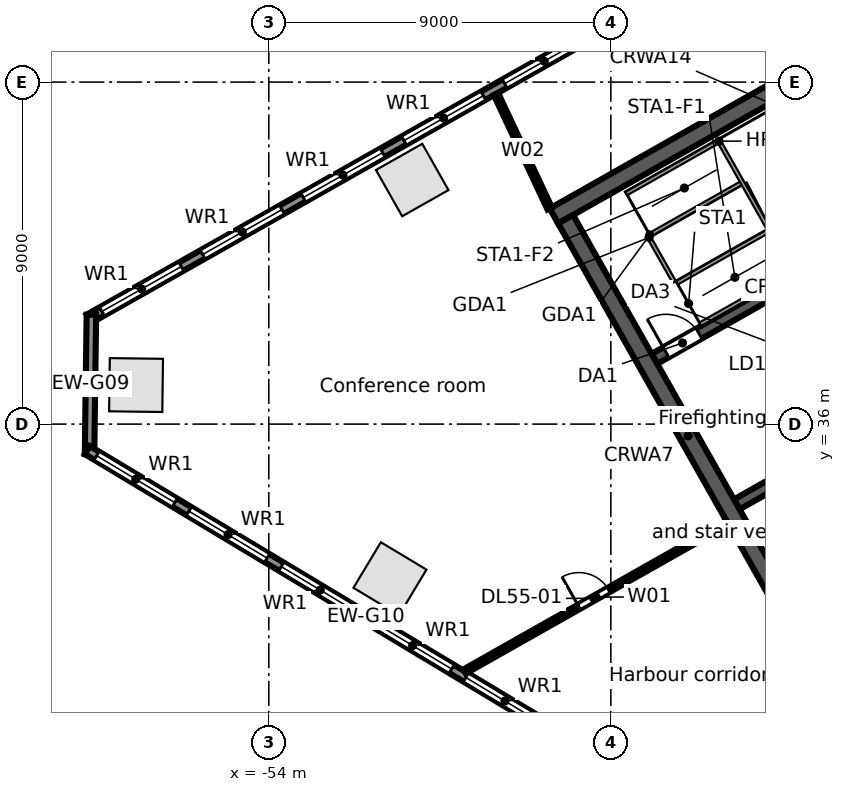
"""IFC4 building model, lengths in metres.
Left out: names, types, materials, properties, quantities, classifications, styles, units other than length and angle.
Written with IfcOpenShell. Run it as: python <this file> out.ifc"""

import sys

from ifc_helpers import new_model, si_unit, direction, frame, frame_2d, origin, origin_2d, place, context, subcontext, project, spatial, rectangle, extrude, element, fill, save


model = new_model("IFC4")
c1 = context("Model", 3, precision=1e-05, world=origin(), true_north=direction((0.0, 1.0)))
c2 = subcontext(c1, "Body", "Model", "MODEL_VIEW")
j1 = project(units=[si_unit("LENGTHUNIT", "METRE"), si_unit("PLANEANGLEUNIT", "RADIAN")], contexts=[c1])
p1 = place(None, origin())
s1 = spatial("IfcSite", under=j1, at=p1, CompositionType="ELEMENT")
p2 = place(p1, origin())
s2 = spatial("IfcBuilding", under=s1, at=p2, CompositionType="ELEMENT")
p3 = place(p2, frame((0.0, 0.0, 254.3)))
s3 = spatial("IfcBuildingStorey", under=s2, at=p3, CompositionType="ELEMENT", Elevation=254.3)
for number, where, z_axis, x_axis in (
    (1, (-50.226, 42.423, 0.0), (0.0, 0.0, 1.0), (-0.87, -0.492, 0.0)),
    (2, (-57.493, 37.027, 0.0), (0.0, 0.0, 1.0), (-0.013, -1.0, 0.0)),
    (3, (-50.812, 31.931, 0.0), (0.0, 0.0, 1.0), (0.857, -0.515, 0.0)),
):
    element("IfcColumn", number, at=place(p3, frame(where, z_axis=z_axis, x_axis=x_axis)), inside=s3, PredefinedType="COLUMN", context=c2, shape_type="SweptSolid", body=[
        extrude(rectangle(XDim=1.4, YDim=1.4, at=origin_2d()), origin(), (0.0, 0.0, 1.0), 3.9),
    ])
p4 = place(p3, frame((-58.732, 38.771, 0.0), z_axis=(0.0, 0.0, 1.0), x_axis=(0.870354824205, 0.492425100887, 0.0)))
e4 = element("IfcWall", 4, at=p4, inside=s3, PredefinedType="STANDARD", context=c2, shape_type="SweptSolid", body=[
    extrude(rectangle(XDim=64.006, YDim=0.25, at=frame_2d((32.003, 0.0))), origin(), (0.0, 0.0, 1.0), 3.55),
])
p5 = place(p4, frame((61.259, 0.0, 0.8)))
e5 = element("IfcOpeningElement", 5, at=p5, cuts=e4, PredefinedType="OPENING", context=c2, shape_type="SweptSolid", body=[
    extrude(rectangle(XDim=2.4, YDim=2.2, at=frame_2d((1.2, 1.1))), frame((0.0, 0.135, 0.0), z_axis=(0.0, -1.0, 0.0), x_axis=(1.0, 0.0, 0.0)), (0.0, 0.0, 1.0), 0.27),
])
p6 = place(p4, frame((58.216, 0.0, 0.8)))
e6 = element("IfcOpeningElement", 6, at=p6, cuts=e4, PredefinedType="OPENING", context=c2, shape_type="SweptSolid", body=[
    extrude(rectangle(XDim=2.4, YDim=2.2, at=frame_2d((1.2, 1.1))), frame((0.0, 0.135, 0.0), z_axis=(0.0, -1.0, 0.0), x_axis=(1.0, 0.0, 0.0)), (0.0, 0.0, 1.0), 0.27),
])
p7 = place(p4, frame((55.173, 0.0, 0.8)))
e7 = element("IfcOpeningElement", 7, at=p7, cuts=e4, PredefinedType="OPENING", context=c2, shape_type="SweptSolid", body=[
    extrude(rectangle(XDim=2.4, YDim=2.2, at=frame_2d((1.2, 1.1))), frame((0.0, 0.135, 0.0), z_axis=(0.0, -1.0, 0.0), x_axis=(1.0, 0.0, 0.0)), (0.0, 0.0, 1.0), 0.27),
])
p8 = place(p4, frame((52.129, 0.0, 0.8)))
e8 = element("IfcOpeningElement", 8, at=p8, cuts=e4, PredefinedType="OPENING", context=c2, shape_type="SweptSolid", body=[
    extrude(rectangle(XDim=2.4, YDim=2.2, at=frame_2d((1.2, 1.1))), frame((0.0, 0.135, 0.0), z_axis=(0.0, -1.0, 0.0), x_axis=(1.0, 0.0, 0.0)), (0.0, 0.0, 1.0), 0.27),
])
p9 = place(p4, frame((49.086, 0.0, 0.8)))
e9 = element("IfcOpeningElement", 9, at=p9, cuts=e4, PredefinedType="OPENING", context=c2, shape_type="SweptSolid", body=[
    extrude(rectangle(XDim=2.4, YDim=2.2, at=frame_2d((1.2, 1.1))), frame((0.0, 0.135, 0.0), z_axis=(0.0, -1.0, 0.0), x_axis=(1.0, 0.0, 0.0)), (0.0, 0.0, 1.0), 0.27),
])
p10 = place(p4, frame((46.043, 0.0, 0.8)))
e10 = element("IfcOpeningElement", 10, at=p10, cuts=e4, PredefinedType="OPENING", context=c2, shape_type="SweptSolid", body=[
    extrude(rectangle(XDim=2.4, YDim=2.2, at=frame_2d((1.2, 1.1))), frame((0.0, 0.135, 0.0), z_axis=(0.0, -1.0, 0.0), x_axis=(1.0, 0.0, 0.0)), (0.0, 0.0, 1.0), 0.27),
])
p11 = place(p4, frame((43.0, 0.0, 0.8)))
e11 = element("IfcOpeningElement", 11, at=p11, cuts=e4, PredefinedType="OPENING", context=c2, shape_type="SweptSolid", body=[
    extrude(rectangle(XDim=2.4, YDim=2.2, at=frame_2d((1.2, 1.1))), frame((0.0, 0.135, 0.0), z_axis=(0.0, -1.0, 0.0), x_axis=(1.0, 0.0, 0.0)), (0.0, 0.0, 1.0), 0.27),
])
p12 = place(p4, frame((39.956, 0.0, 0.8)))
e12 = element("IfcOpeningElement", 12, at=p12, cuts=e4, PredefinedType="OPENING", context=c2, shape_type="SweptSolid", body=[
    extrude(rectangle(XDim=2.4, YDim=2.2, at=frame_2d((1.2, 1.1))), frame((0.0, 0.135, 0.0), z_axis=(0.0, -1.0, 0.0), x_axis=(1.0, 0.0, 0.0)), (0.0, 0.0, 1.0), 0.27),
])
p13 = place(p4, frame((36.913, 0.0, 0.8)))
e13 = element("IfcOpeningElement", 13, at=p13, cuts=e4, PredefinedType="OPENING", context=c2, shape_type="SweptSolid", body=[
    extrude(rectangle(XDim=2.4, YDim=2.2, at=frame_2d((1.2, 1.1))), frame((0.0, 0.135, 0.0), z_axis=(0.0, -1.0, 0.0), x_axis=(1.0, 0.0, 0.0)), (0.0, 0.0, 1.0), 0.27),
])
p14 = place(p4, frame((33.87, 0.0, 0.8)))
e14 = element("IfcOpeningElement", 14, at=p14, cuts=e4, PredefinedType="OPENING", context=c2, shape_type="SweptSolid", body=[
    extrude(rectangle(XDim=2.4, YDim=2.2, at=frame_2d((1.2, 1.1))), frame((0.0, 0.135, 0.0), z_axis=(0.0, -1.0, 0.0), x_axis=(1.0, 0.0, 0.0)), (0.0, 0.0, 1.0), 0.27),
])
p15 = place(p4, frame((30.826, 0.0, 0.8)))
e15 = element("IfcOpeningElement", 15, at=p15, cuts=e4, PredefinedType="OPENING", context=c2, shape_type="SweptSolid", body=[
    extrude(rectangle(XDim=2.4, YDim=2.2, at=frame_2d((1.2, 1.1))), frame((0.0, 0.135, 0.0), z_axis=(0.0, -1.0, 0.0), x_axis=(1.0, 0.0, 0.0)), (0.0, 0.0, 1.0), 0.27),
])
p16 = place(p4, frame((27.783, 0.0, 0.8)))
e16 = element("IfcOpeningElement", 16, at=p16, cuts=e4, PredefinedType="OPENING", context=c2, shape_type="SweptSolid", body=[
    extrude(rectangle(XDim=2.4, YDim=2.2, at=frame_2d((1.2, 1.1))), frame((0.0, 0.135, 0.0), z_axis=(0.0, -1.0, 0.0), x_axis=(1.0, 0.0, 0.0)), (0.0, 0.0, 1.0), 0.27),
])
p17 = place(p4, frame((24.74, 0.0, 0.8)))
e17 = element("IfcOpeningElement", 17, at=p17, cuts=e4, PredefinedType="OPENING", context=c2, shape_type="SweptSolid", body=[
    extrude(rectangle(XDim=2.4, YDim=2.2, at=frame_2d((1.2, 1.1))), frame((0.0, 0.135, 0.0), z_axis=(0.0, -1.0, 0.0), x_axis=(1.0, 0.0, 0.0)), (0.0, 0.0, 1.0), 0.27),
])
p18 = place(p4, frame((21.696, 0.0, 0.8)))
e18 = element("IfcOpeningElement", 18, at=p18, cuts=e4, PredefinedType="OPENING", context=c2, shape_type="SweptSolid", body=[
    extrude(rectangle(XDim=2.4, YDim=2.2, at=frame_2d((1.2, 1.1))), frame((0.0, 0.135, 0.0), z_axis=(0.0, -1.0, 0.0), x_axis=(1.0, 0.0, 0.0)), (0.0, 0.0, 1.0), 0.27),
])
p19 = place(p4, frame((18.653, 0.0, 0.8)))
e19 = element("IfcOpeningElement", 19, at=p19, cuts=e4, PredefinedType="OPENING", context=c2, shape_type="SweptSolid", body=[
    extrude(rectangle(XDim=2.4, YDim=2.2, at=frame_2d((1.2, 1.1))), frame((0.0, 0.135, 0.0), z_axis=(0.0, -1.0, 0.0), x_axis=(1.0, 0.0, 0.0)), (0.0, 0.0, 1.0), 0.27),
])
p20 = place(p4, frame((15.61, 0.0, 0.8)))
e20 = element("IfcOpeningElement", 20, at=p20, cuts=e4, PredefinedType="OPENING", context=c2, shape_type="SweptSolid", body=[
    extrude(rectangle(XDim=2.4, YDim=2.2, at=frame_2d((1.2, 1.1))), frame((0.0, 0.135, 0.0), z_axis=(0.0, -1.0, 0.0), x_axis=(1.0, 0.0, 0.0)), (0.0, 0.0, 1.0), 0.27),
])
p21 = place(p4, frame((12.567, 0.0, 0.8)))
e21 = element("IfcOpeningElement", 21, at=p21, cuts=e4, PredefinedType="OPENING", context=c2, shape_type="SweptSolid", body=[
    extrude(rectangle(XDim=2.4, YDim=2.2, at=frame_2d((1.2, 1.1))), frame((0.0, 0.135, 0.0), z_axis=(0.0, -1.0, 0.0), x_axis=(1.0, 0.0, 0.0)), (0.0, 0.0, 1.0), 0.27),
])
p22 = place(p4, frame((9.523, 0.0, 0.8)))
e22 = element("IfcOpeningElement", 22, at=p22, cuts=e4, PredefinedType="OPENING", context=c2, shape_type="SweptSolid", body=[
    extrude(rectangle(XDim=2.4, YDim=2.2, at=frame_2d((1.2, 1.1))), frame((0.0, 0.135, 0.0), z_axis=(0.0, -1.0, 0.0), x_axis=(1.0, 0.0, 0.0)), (0.0, 0.0, 1.0), 0.27),
])
p23 = place(p4, frame((6.48, 0.0, 0.8)))
e23 = element("IfcOpeningElement", 23, at=p23, cuts=e4, PredefinedType="OPENING", context=c2, shape_type="SweptSolid", body=[
    extrude(rectangle(XDim=2.4, YDim=2.2, at=frame_2d((1.2, 1.1))), frame((0.0, 0.135, 0.0), z_axis=(0.0, -1.0, 0.0), x_axis=(1.0, 0.0, 0.0)), (0.0, 0.0, 1.0), 0.27),
])
p24 = place(p4, frame((3.437, 0.0, 0.8)))
e24 = element("IfcOpeningElement", 24, at=p24, cuts=e4, PredefinedType="OPENING", context=c2, shape_type="SweptSolid", body=[
    extrude(rectangle(XDim=2.4, YDim=2.2, at=frame_2d((1.2, 1.1))), frame((0.0, 0.135, 0.0), z_axis=(0.0, -1.0, 0.0), x_axis=(1.0, 0.0, 0.0)), (0.0, 0.0, 1.0), 0.27),
])
p25 = place(p4, frame((0.393, 0.0, 0.8)))
e25 = element("IfcOpeningElement", 25, at=p25, cuts=e4, PredefinedType="OPENING", context=c2, shape_type="SweptSolid", body=[
    extrude(rectangle(XDim=2.4, YDim=2.2, at=frame_2d((1.2, 1.1))), frame((0.0, 0.135, 0.0), z_axis=(0.0, -1.0, 0.0), x_axis=(1.0, 0.0, 0.0)), (0.0, 0.0, 1.0), 0.27),
])
p26 = place(p3, frame((-58.717, 35.208, 0.0), z_axis=(0.0, 0.0, 1.0), x_axis=(0.01310512158, 0.999914124207, 0.0)))
e26 = element("IfcWall", 26, at=p26, inside=s3, PredefinedType="STANDARD", context=c2, shape_type="SweptSolid", body=[
    extrude(rectangle(XDim=3.67, YDim=0.25, at=frame_2d((1.835, 0.0))), origin(), (0.0, 0.0, 1.0), 3.55),
])
p27 = place(p3, frame((-44.115, 26.507, 0.0), z_axis=(0.0, 0.0, 1.0), x_axis=(-0.857166583633, 0.515039268311, 0.0)))
e27 = element("IfcWall", 27, at=p27, inside=s3, PredefinedType="STANDARD", context=c2, shape_type="SweptSolid", body=[
    extrude(rectangle(XDim=17.106, YDim=0.25, at=frame_2d((8.553, 0.0))), origin(), (0.0, 0.0, 1.0), 3.55),
])
p28 = place(p27, frame((14.417, 0.0, 0.8)))
e28 = element("IfcOpeningElement", 28, at=p28, cuts=e27, PredefinedType="OPENING", context=c2, shape_type="SweptSolid", body=[
    extrude(rectangle(XDim=2.4, YDim=2.2, at=frame_2d((1.2, 1.1))), frame((0.0, 0.135, 0.0), z_axis=(0.0, -1.0, 0.0), x_axis=(1.0, 0.0, 0.0)), (0.0, 0.0, 1.0), 0.27),
])
p29 = place(p27, frame((11.584, 0.0, 0.8)))
e29 = element("IfcOpeningElement", 29, at=p29, cuts=e27, PredefinedType="OPENING", context=c2, shape_type="SweptSolid", body=[
    extrude(rectangle(XDim=2.4, YDim=2.2, at=frame_2d((1.2, 1.1))), frame((0.0, 0.135, 0.0), z_axis=(0.0, -1.0, 0.0), x_axis=(1.0, 0.0, 0.0)), (0.0, 0.0, 1.0), 0.27),
])
p30 = place(p27, frame((8.75, 0.0, 0.8)))
e30 = element("IfcOpeningElement", 30, at=p30, cuts=e27, PredefinedType="OPENING", context=c2, shape_type="SweptSolid", body=[
    extrude(rectangle(XDim=2.4, YDim=2.2, at=frame_2d((1.2, 1.1))), frame((0.0, 0.135, 0.0), z_axis=(0.0, -1.0, 0.0), x_axis=(1.0, 0.0, 0.0)), (0.0, 0.0, 1.0), 0.27),
])
p31 = place(p27, frame((5.917, 0.0, 0.8)))
e31 = element("IfcOpeningElement", 31, at=p31, cuts=e27, PredefinedType="OPENING", context=c2, shape_type="SweptSolid", body=[
    extrude(rectangle(XDim=2.4, YDim=2.2, at=frame_2d((1.2, 1.1))), frame((0.0, 0.135, 0.0), z_axis=(0.0, -1.0, 0.0), x_axis=(1.0, 0.0, 0.0)), (0.0, 0.0, 1.0), 0.27),
])
p32 = place(p27, frame((3.084, 0.0, 0.8)))
e32 = element("IfcOpeningElement", 32, at=p32, cuts=e27, PredefinedType="OPENING", context=c2, shape_type="SweptSolid", body=[
    extrude(rectangle(XDim=2.4, YDim=2.2, at=frame_2d((1.2, 1.1))), frame((0.0, 0.135, 0.0), z_axis=(0.0, -1.0, 0.0), x_axis=(1.0, 0.0, 0.0)), (0.0, 0.0, 1.0), 0.27),
])
p33 = place(p27, frame((0.25, 0.0, 0.8)))
e33 = element("IfcOpeningElement", 33, at=p33, cuts=e27, PredefinedType="OPENING", context=c2, shape_type="SweptSolid", body=[
    extrude(rectangle(XDim=2.4, YDim=2.2, at=frame_2d((1.2, 1.1))), frame((0.0, 0.135, 0.0), z_axis=(0.0, -1.0, 0.0), x_axis=(1.0, 0.0, 0.0)), (0.0, 0.0, 1.0), 0.27),
])
p34 = place(p3, frame((-41.687, 33.887, 0.0), z_axis=(0.0, 0.0, 1.0), x_axis=(0.870355736587, 0.49242348826, 0.0)))
e34 = element("IfcWall", 34, at=p34, inside=s3, PredefinedType="SOLIDWALL", context=c2, shape_type="SweptSolid", body=[
    extrude(rectangle(XDim=6.15, YDim=0.3, at=frame_2d((3.075, 0.0))), origin(), (0.0, 0.0, 1.0), 3.55),
])
p35 = place(p34, frame((1.25, 0.0, 0.0)))
e35 = element("IfcOpeningElement", 35, at=p35, cuts=e34, PredefinedType="OPENING", context=c2, shape_type="SweptSolid", body=[
    extrude(rectangle(XDim=1.1, YDim=2.1, at=frame_2d((0.55, 1.05))), frame((0.0, 0.16, 0.0), z_axis=(0.0, -1.0, 0.0), x_axis=(1.0, 0.0, 0.0)), (0.0, 0.0, 1.0), 0.32),
])
p36 = place(p34, frame((4.4, 0.0, 0.0)))
e36 = element("IfcOpeningElement", 36, at=p36, cuts=e34, PredefinedType="OPENING", context=c2, shape_type="SweptSolid", body=[
    extrude(rectangle(XDim=1.1, YDim=2.1, at=frame_2d((0.55, 1.05))), frame((0.0, 0.16, 0.0), z_axis=(0.0, -1.0, 0.0), x_axis=(1.0, 0.0, 0.0)), (0.0, 0.0, 1.0), 0.32),
])
p37 = place(p3, frame((-43.853, 37.717, 0.0), z_axis=(0.0, 0.0, 1.0), x_axis=(0.870360409231, 0.492415229297, 0.0)))
e37 = element("IfcWall", 37, at=p37, inside=s3, PredefinedType="SOLIDWALL", context=c2, shape_type="SweptSolid", body=[
    extrude(rectangle(XDim=7.55, YDim=0.3, at=frame_2d((3.775, 0.0))), origin(), (0.0, 0.0, 1.0), 3.55),
])
p38 = place(p37, frame((0.35, 0.0, 0.0)))
e38 = element("IfcOpeningElement", 38, at=p38, cuts=e37, PredefinedType="OPENING", context=c2, shape_type="SweptSolid", body=[
    extrude(rectangle(XDim=1.0, YDim=2.1, at=frame_2d((0.5, 1.05))), frame((0.0, 0.16, 0.0), z_axis=(0.0, -1.0, 0.0), x_axis=(1.0, 0.0, 0.0)), (0.0, 0.0, 1.0), 0.32),
])
p39 = place(p3, frame((-46.498, 41.477, 0.0), z_axis=(0.0, 0.0, 1.0), x_axis=(0.870359753402, 0.492416388494, 0.0)))
e39 = element("IfcWall", 39, at=p39, inside=s3, PredefinedType="SOLIDWALL", context=c2, shape_type="SweptSolid", body=[
    extrude(rectangle(XDim=17.0, YDim=0.45, at=frame_2d((8.5, 0.0))), origin(), (0.0, 0.0, 1.0), 3.55),
])
p40 = place(p3, frame((-46.191, 41.392, 0.0), z_axis=(0.0, 0.0, 1.0), x_axis=(0.492421378713, -0.870356930107, 0.0)))
e40 = element("IfcWall", 40, at=p40, inside=s3, PredefinedType="SOLIDWALL", context=c2, shape_type="SweptSolid", body=[
    extrude(rectangle(XDim=13.1, YDim=0.45, at=frame_2d((6.55, 0.0))), origin(), (0.0, 0.0, 1.0), 3.55),
])
p41 = place(p3, frame((-48.843, 29.494, 0.0), z_axis=(0.0, 0.0, 1.0), x_axis=(0.870384139606, 0.492373282705, 0.0)))
e41 = element("IfcWall", 41, at=p41, inside=s3, PredefinedType="PARTITIONING", context=c2, shape_type="SweptSolid", body=[
    extrude(rectangle(XDim=7.941, YDim=0.125, at=frame_2d((3.971, 0.0))), origin(), (0.0, 0.0, 1.0), 2.73),
])
p42 = place(p41, frame((3.45, 0.0, 0.0)))
e42 = element("IfcOpeningElement", 42, at=p42, cuts=e41, PredefinedType="OPENING", context=c2, shape_type="SweptSolid", body=[
    extrude(rectangle(XDim=0.9, YDim=2.1, at=frame_2d((0.45, 1.05))), frame((0.0, 0.073, 0.0), z_axis=(0.0, -1.0, 0.0), x_axis=(1.0, 0.0, 0.0)), (0.0, 0.0, 1.0), 0.145),
])
p43 = place(p3, frame((-48.022, 44.687, 0.0), z_axis=(0.0, 0.0, 1.0), x_axis=(0.424510917438, -0.905422818895, 0.0)))
e43 = element("IfcWall", 43, at=p43, inside=s3, PredefinedType="PARTITIONING", context=c2, shape_type="SweptSolid", body=[
    extrude(rectangle(XDim=3.329, YDim=0.125, at=frame_2d((1.665, 0.0))), origin(), (0.0, 0.0, 1.0), 2.73),
])
p44 = place(p21, origin())
e44 = element("IfcWindow", 44, at=p44, inside=s3, PartitioningType="SINGLE_PANEL", PredefinedType="WINDOW", context=c2, shape_type="SweptSolid", body=[
    extrude(rectangle(XDim=2.4, YDim=2.2, at=frame_2d((1.2, 1.1))), frame((0.0, 0.03, 0.0), z_axis=(0.0, -1.0, 0.0), x_axis=(1.0, 0.0, 0.0)), (0.0, 0.0, 1.0), 0.06),
])
fill(e21, e44)
p45 = place(p22, origin())
e45 = element("IfcWindow", 45, at=p45, inside=s3, PartitioningType="SINGLE_PANEL", PredefinedType="WINDOW", context=c2, shape_type="SweptSolid", body=[
    extrude(rectangle(XDim=2.4, YDim=2.2, at=frame_2d((1.2, 1.1))), frame((0.0, 0.03, 0.0), z_axis=(0.0, -1.0, 0.0), x_axis=(1.0, 0.0, 0.0)), (0.0, 0.0, 1.0), 0.06),
])
fill(e22, e45)
p46 = place(p23, origin())
e46 = element("IfcWindow", 46, at=p46, inside=s3, PartitioningType="SINGLE_PANEL", PredefinedType="WINDOW", context=c2, shape_type="SweptSolid", body=[
    extrude(rectangle(XDim=2.4, YDim=2.2, at=frame_2d((1.2, 1.1))), frame((0.0, 0.03, 0.0), z_axis=(0.0, -1.0, 0.0), x_axis=(1.0, 0.0, 0.0)), (0.0, 0.0, 1.0), 0.06),
])
fill(e23, e46)
p47 = place(p24, origin())
e47 = element("IfcWindow", 47, at=p47, inside=s3, PartitioningType="SINGLE_PANEL", PredefinedType="WINDOW", context=c2, shape_type="SweptSolid", body=[
    extrude(rectangle(XDim=2.4, YDim=2.2, at=frame_2d((1.2, 1.1))), frame((0.0, 0.03, 0.0), z_axis=(0.0, -1.0, 0.0), x_axis=(1.0, 0.0, 0.0)), (0.0, 0.0, 1.0), 0.06),
])
fill(e24, e47)
p48 = place(p25, origin())
e48 = element("IfcWindow", 48, at=p48, inside=s3, PartitioningType="SINGLE_PANEL", PredefinedType="WINDOW", context=c2, shape_type="SweptSolid", body=[
    extrude(rectangle(XDim=2.4, YDim=2.2, at=frame_2d((1.2, 1.1))), frame((0.0, 0.03, 0.0), z_axis=(0.0, -1.0, 0.0), x_axis=(1.0, 0.0, 0.0)), (0.0, 0.0, 1.0), 0.06),
])
fill(e25, e48)
p49 = place(p28, origin())
e49 = element("IfcWindow", 49, at=p49, inside=s3, PartitioningType="SINGLE_PANEL", PredefinedType="WINDOW", context=c2, shape_type="SweptSolid", body=[
    extrude(rectangle(XDim=2.4, YDim=2.2, at=frame_2d((1.2, 1.1))), frame((0.0, 0.03, 0.0), z_axis=(0.0, -1.0, 0.0), x_axis=(1.0, 0.0, 0.0)), (0.0, 0.0, 1.0), 0.06),
])
fill(e28, e49)
p50 = place(p29, origin())
e50 = element("IfcWindow", 50, at=p50, inside=s3, PartitioningType="SINGLE_PANEL", PredefinedType="WINDOW", context=c2, shape_type="SweptSolid", body=[
    extrude(rectangle(XDim=2.4, YDim=2.2, at=frame_2d((1.2, 1.1))), frame((0.0, 0.03, 0.0), z_axis=(0.0, -1.0, 0.0), x_axis=(1.0, 0.0, 0.0)), (0.0, 0.0, 1.0), 0.06),
])
fill(e29, e50)
p51 = place(p30, origin())
e51 = element("IfcWindow", 51, at=p51, inside=s3, PartitioningType="SINGLE_PANEL", PredefinedType="WINDOW", context=c2, shape_type="SweptSolid", body=[
    extrude(rectangle(XDim=2.4, YDim=2.2, at=frame_2d((1.2, 1.1))), frame((0.0, 0.03, 0.0), z_axis=(0.0, -1.0, 0.0), x_axis=(1.0, 0.0, 0.0)), (0.0, 0.0, 1.0), 0.06),
])
fill(e30, e51)
p52 = place(p31, origin())
e52 = element("IfcWindow", 52, at=p52, inside=s3, PartitioningType="SINGLE_PANEL", PredefinedType="WINDOW", context=c2, shape_type="SweptSolid", body=[
    extrude(rectangle(XDim=2.4, YDim=2.2, at=frame_2d((1.2, 1.1))), frame((0.0, 0.03, 0.0), z_axis=(0.0, -1.0, 0.0), x_axis=(1.0, 0.0, 0.0)), (0.0, 0.0, 1.0), 0.06),
])
fill(e31, e52)
p53 = place(p32, origin())
e53 = element("IfcWindow", 53, at=p53, inside=s3, PartitioningType="SINGLE_PANEL", PredefinedType="WINDOW", context=c2, shape_type="SweptSolid", body=[
    extrude(rectangle(XDim=2.4, YDim=2.2, at=frame_2d((1.2, 1.1))), frame((0.0, 0.03, 0.0), z_axis=(0.0, -1.0, 0.0), x_axis=(1.0, 0.0, 0.0)), (0.0, 0.0, 1.0), 0.06),
])
fill(e32, e53)
p54 = place(p38, origin())
e54 = element("IfcDoor", 54, at=p54, inside=s3, OperationType="SINGLE_SWING_LEFT", PredefinedType="DOOR", context=c2, shape_type="SweptSolid", body=[
    extrude(rectangle(XDim=1.0, YDim=2.1, at=frame_2d((0.5, 1.05))), frame((0.0, 0.025, 0.0), z_axis=(0.0, -1.0, 0.0), x_axis=(1.0, 0.0, 0.0)), (0.0, 0.0, 1.0), 0.05),
])
fill(e38, e54)
p55 = place(p42, origin())
e55 = element("IfcDoor", 55, at=p55, inside=s3, OperationType="SINGLE_SWING_LEFT", PredefinedType="DOOR", context=c2, shape_type="SweptSolid", body=[
    extrude(rectangle(XDim=0.9, YDim=2.1, at=frame_2d((0.45, 1.05))), frame((0.0, 0.025, 0.0), z_axis=(0.0, -1.0, 0.0), x_axis=(1.0, 0.0, 0.0)), (0.0, 0.0, 1.0), 0.05),
])
fill(e42, e55)
save(model, sys.argv[1])
